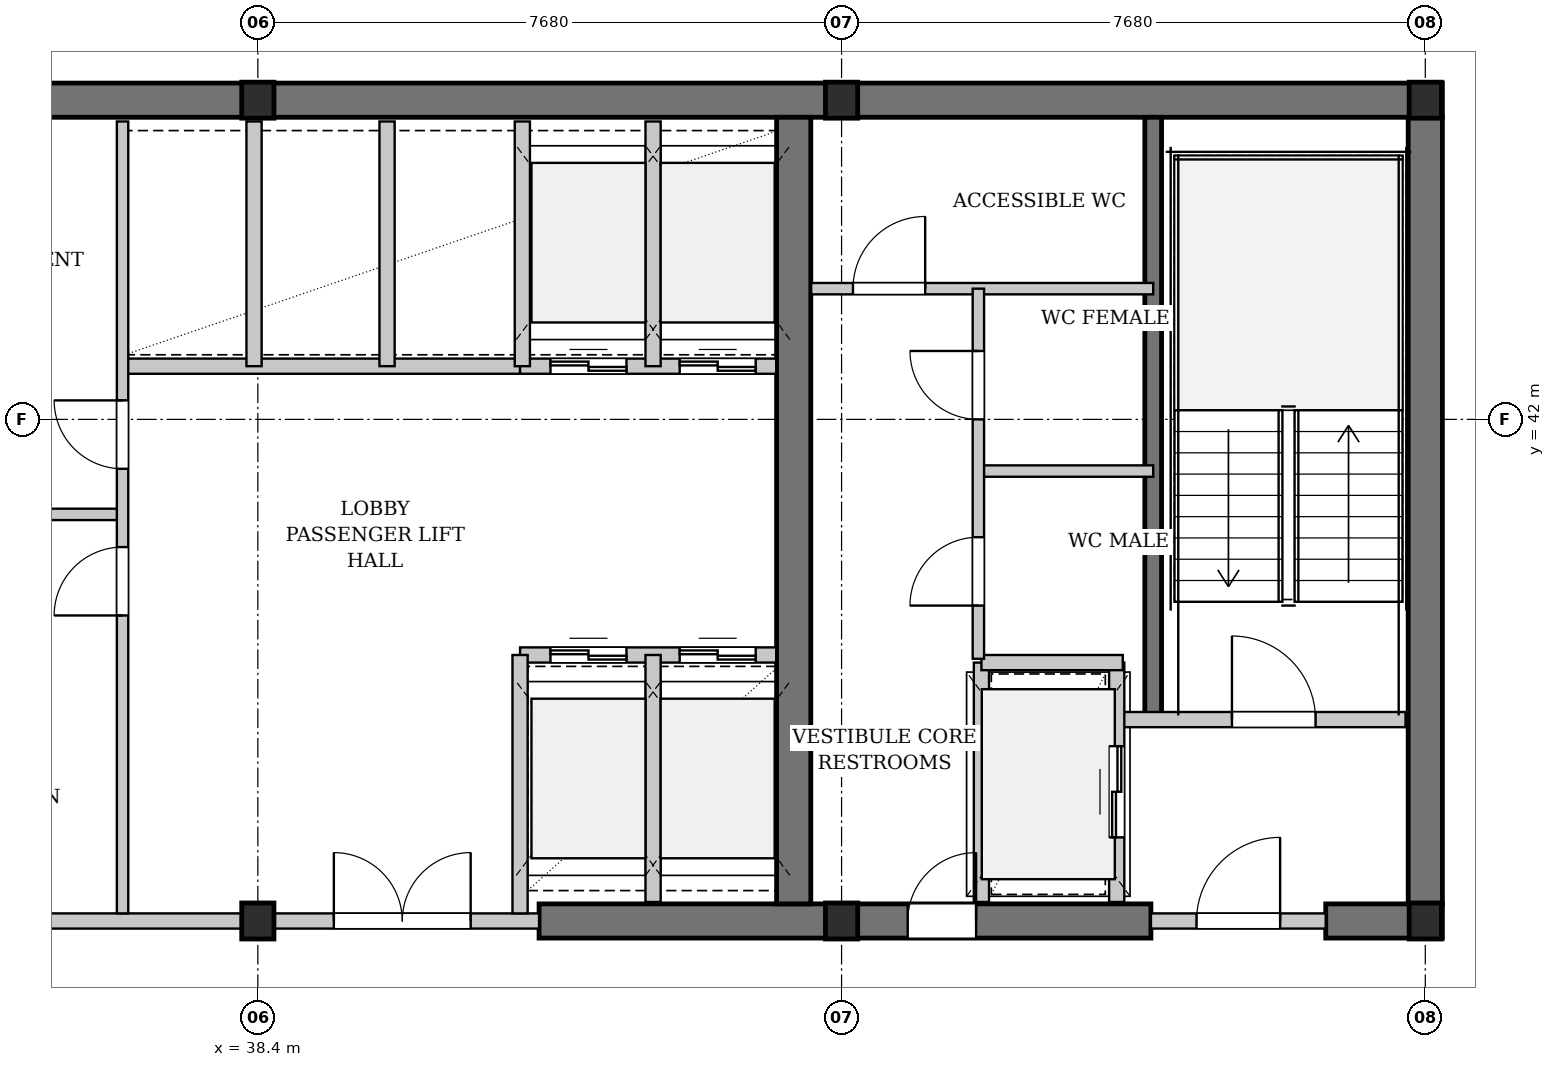
"""IFC4 building model, lengths in metres.
Left out: names, types, materials, properties, quantities, classifications, styles, units other than length and angle.
Written with IfcOpenShell. Run it as: python <this file> out.ifc"""

import sys

from ifc_helpers import new_model, si_unit, direction, frame, frame_2d, origin, origin_2d, place, context, subcontext, project, spatial, rectangle, i_section, extrude, element, fill, save


model = new_model("IFC4")
c1 = context("Model", 3, precision=1e-05, world=origin(), true_north=direction((0.0, 1.0)))
c2 = subcontext(c1, "Body", "Model", "MODEL_VIEW")
j1 = project(units=[si_unit("LENGTHUNIT", "METRE"), si_unit("PLANEANGLEUNIT", "RADIAN")], contexts=[c1])
p1 = place(None, origin())
s1 = spatial("IfcSite", under=j1, at=p1, CompositionType="ELEMENT")
p2 = place(p1, origin())
s2 = spatial("IfcBuilding", under=s1, at=p2, CompositionType="ELEMENT")
p3 = place(p2, frame((0.0, 0.0, 106.7)))
s3 = spatial("IfcBuildingStorey", under=s2, at=p3, CompositionType="ELEMENT", Elevation=106.7)
p4 = place(p3, frame((22.815, 46.2, 0.0), z_axis=(0.0, 0.0, 1.0), x_axis=(1.0, 0.0, 0.0)))
e1 = element("IfcWall", 1, at=p4, inside=s3, PredefinedType="SHEAR", context=c2, shape_type="SweptSolid", body=[
    extrude(rectangle(XDim=31.17, YDim=0.45, at=frame_2d((15.585, 0.0))), origin(), (0.0, 0.0, 1.0), 3.18),
])
p5 = place(p3, frame((42.1, 35.4, 0.0), z_axis=(0.0, 0.0, 1.0), x_axis=(1.0, 0.0, 0.0)))
e2 = element("IfcWall", 2, at=p5, inside=s3, PredefinedType="SHEAR", context=c2, shape_type="SweptSolid", body=[
    extrude(rectangle(XDim=8.05, YDim=0.45, at=frame_2d((4.025, 0.0))), origin(), (0.0, 0.0, 1.0), 3.18),
])
p6 = place(p5, frame((4.85, 0.0, 0.0)))
e3 = element("IfcOpeningElement", 3, at=p6, cuts=e2, PredefinedType="OPENING", context=c2, shape_type="SweptSolid", body=[
    extrude(rectangle(XDim=0.9, YDim=2.15, at=frame_2d((0.45, 1.075))), frame((0.0, 0.235, 0.0), z_axis=(0.0, -1.0, 0.0), x_axis=(1.0, 0.0, 0.0)), (0.0, 0.0, 1.0), 0.47),
])
p7 = place(p3, frame((52.45, 35.4, 0.0), z_axis=(0.0, 0.0, 1.0), x_axis=(1.0, 0.0, 0.0)))
e4 = element("IfcWall", 4, at=p7, inside=s3, PredefinedType="SHEAR", context=c2, shape_type="SweptSolid", body=[
    extrude(rectangle(XDim=1.535, YDim=0.45, at=frame_2d((0.768, 0.0))), origin(), (0.0, 0.0, 1.0), 3.18),
])
for number, where, z_axis, x_axis in (
    (5, (45.45, 35.625, 0.0), (0.0, 0.0, 1.0), (0.0, 1.0, 0.0)),
    (6, (53.76, 35.625, 0.0), (0.0, 0.0, 1.0), (0.0, 1.0, 0.0)),
):
    element("IfcWall", number, at=place(p3, frame(where, z_axis=z_axis, x_axis=x_axis)), inside=s3, PredefinedType="SHEAR", context=c2, shape_type="SweptSolid", body=[
        extrude(rectangle(XDim=10.35, YDim=0.45, at=frame_2d((5.175, 0.0))), origin(), (0.0, 0.0, 1.0), 3.18),
    ])
p8 = place(p3, frame((50.18, 38.05, 0.0), z_axis=(0.0, 0.0, 1.0), x_axis=(0.0, 1.0, 0.0)))
e7 = element("IfcWall", 7, at=p8, inside=s3, PredefinedType="SHEAR", context=c2, shape_type="SweptSolid", body=[
    extrude(rectangle(XDim=7.925, YDim=0.22, at=frame_2d((3.962, 0.0))), origin(), (0.0, 0.0, 1.0), 3.18),
])
for number, where, z_axis, x_axis in (
    (8, (38.4, 35.4, 0.0), (0.0, 0.0, 1.0), (1.0, 0.0, 0.0)),
    (9, (38.4, 46.2, 0.0), (0.0, 0.0, 1.0), (1.0, 0.0, 0.0)),
    (10, (46.08, 35.4, 0.0), (0.0, 0.0, 1.0), (1.0, 0.0, 0.0)),
    (11, (46.08, 46.2, 0.0), (0.0, 0.0, 1.0), (1.0, 0.0, 0.0)),
    (12, (53.76, 35.4, 0.0), (0.0, 0.0, 1.0), (1.0, 0.0, 0.0)),
    (13, (53.76, 46.2, 0.0), (0.0, 0.0, 1.0), (1.0, 0.0, 0.0)),
):
    element("IfcColumn", number, at=place(p3, frame(where, z_axis=z_axis, x_axis=x_axis)), inside=s3, PredefinedType="COLUMN", context=c2, shape_type="SweptSolid", body=[
        extrude(i_section(OverallWidth=0.424, OverallDepth=0.474, WebThickness=0.047, FlangeThickness=0.077, FilletRadius=0.015, at=origin_2d()), origin(), (0.0, 0.0, 1.0), 3.4),
    ])
p9 = place(p3, frame((35.6, 35.4, 0.0), z_axis=(0.0, 0.0, 1.0), x_axis=(1.0, 0.0, 0.0)))
e14 = element("IfcWall", 14, at=p9, inside=s3, PredefinedType="PARTITIONING", context=c2, shape_type="SweptSolid", body=[
    extrude(rectangle(XDim=6.5, YDim=0.2, at=frame_2d((3.25, 0.0))), origin(), (0.0, 0.0, 1.0), 2.525),
])
p10 = place(p9, frame((3.8, 0.0, 0.0)))
e15 = element("IfcOpeningElement", 15, at=p10, cuts=e14, PredefinedType="OPENING", context=c2, shape_type="SweptSolid", body=[
    extrude(rectangle(XDim=1.8, YDim=2.3, at=frame_2d((0.9, 1.15))), frame((0.0, 0.11, 0.0), z_axis=(0.0, -1.0, 0.0), x_axis=(1.0, 0.0, 0.0)), (0.0, 0.0, 1.0), 0.22),
])
p11 = place(p3, frame((36.6, 42.7, 0.0), z_axis=(0.0, 0.0, 1.0), x_axis=(1.0, 0.0, 0.0)))
e16 = element("IfcWall", 16, at=p11, inside=s3, PredefinedType="PARTITIONING", context=c2, shape_type="SweptSolid", body=[
    extrude(rectangle(XDim=5.25, YDim=0.2, at=frame_2d((2.625, 0.0))), origin(), (0.0, 0.0, 1.0), 3.18),
])
p12 = place(p3, frame((38.35, 42.7, 0.0), z_axis=(0.0, 0.0, 1.0), x_axis=(0.0, 1.0, 0.0)))
e17 = element("IfcWall", 17, at=p12, inside=s3, PredefinedType="PARTITIONING", context=c2, shape_type="SweptSolid", body=[
    extrude(rectangle(XDim=3.22, YDim=0.2, at=frame_2d((1.61, 0.0))), origin(), (0.0, 0.0, 1.0), 2.525),
])
p13 = place(p3, frame((40.1, 42.7, 0.0), z_axis=(0.0, 0.0, 1.0), x_axis=(0.0, 1.0, 0.0)))
e18 = element("IfcWall", 18, at=p13, inside=s3, PredefinedType="PARTITIONING", context=c2, shape_type="SweptSolid", body=[
    extrude(rectangle(XDim=3.22, YDim=0.2, at=frame_2d((1.61, 0.0))), origin(), (0.0, 0.0, 1.0), 3.18),
])
p14 = place(p3, frame((33.05, 40.75, 0.0), z_axis=(0.0, 0.0, 1.0), x_axis=(1.0, 0.0, 0.0)))
e19 = element("IfcWall", 19, at=p14, inside=s3, PredefinedType="PARTITIONING", context=c2, shape_type="SweptSolid", body=[
    extrude(rectangle(XDim=3.57, YDim=0.15, at=frame_2d((1.785, 0.0))), origin(), (0.0, 0.0, 1.0), 3.18),
])
p15 = place(p3, frame((36.62, 35.5, 0.0), z_axis=(0.0, 0.0, 1.0), x_axis=(0.0, 1.0, 0.0)))
e20 = element("IfcWall", 20, at=p15, inside=s3, PredefinedType="PARTITIONING", context=c2, shape_type="SweptSolid", body=[
    extrude(rectangle(XDim=10.42, YDim=0.15, at=frame_2d((5.21, 0.0))), origin(), (0.0, 0.0, 1.0), 3.18),
])
p16 = place(p15, frame((3.92, 0.0, 0.0)))
e21 = element("IfcOpeningElement", 21, at=p16, cuts=e20, PredefinedType="OPENING", context=c2, shape_type="SweptSolid", body=[
    extrude(rectangle(XDim=0.9, YDim=2.15, at=frame_2d((0.45, 1.075))), frame((0.0, 0.085, 0.0), z_axis=(0.0, -1.0, 0.0), x_axis=(1.0, 0.0, 0.0)), (0.0, 0.0, 1.0), 0.17),
])
p17 = place(p15, frame((5.85, 0.0, 0.0)))
e22 = element("IfcOpeningElement", 22, at=p17, cuts=e20, PredefinedType="OPENING", context=c2, shape_type="SweptSolid", body=[
    extrude(rectangle(XDim=0.9, YDim=2.15, at=frame_2d((0.45, 1.075))), frame((0.0, 0.085, 0.0), z_axis=(0.0, -1.0, 0.0), x_axis=(1.0, 0.0, 0.0)), (0.0, 0.0, 1.0), 0.17),
])
p18 = place(p3, frame((41.85, 38.9, 0.0), z_axis=(0.0, 0.0, 1.0), x_axis=(1.0, 0.0, 0.0)))
e23 = element("IfcWall", 23, at=p18, inside=s3, PredefinedType="PARTITIONING", context=c2, shape_type="SweptSolid", body=[
    extrude(rectangle(XDim=3.37, YDim=0.2, at=frame_2d((1.685, 0.0))), origin(), (0.0, 0.0, 1.0), 3.18),
])
p19 = place(p18, frame((0.4, 0.0, 0.0)))
e24 = element("IfcOpeningElement", 24, at=p19, cuts=e23, PredefinedType="OPENING", context=c2, shape_type="SweptSolid", body=[
    extrude(rectangle(XDim=1.0, YDim=2.2, at=frame_2d((0.5, 1.1))), frame((0.0, 0.11, 0.0), z_axis=(0.0, -1.0, 0.0), x_axis=(1.0, 0.0, 0.0)), (0.0, 0.0, 1.0), 0.22),
])
p20 = place(p18, frame((2.1, 0.0, 0.0)))
e25 = element("IfcOpeningElement", 25, at=p20, cuts=e23, PredefinedType="OPENING", context=c2, shape_type="SweptSolid", body=[
    extrude(rectangle(XDim=1.0, YDim=2.2, at=frame_2d((0.5, 1.1))), frame((0.0, 0.11, 0.0), z_axis=(0.0, -1.0, 0.0), x_axis=(1.0, 0.0, 0.0)), (0.0, 0.0, 1.0), 0.22),
])
p21 = place(p3, frame((41.85, 42.7, 0.0), z_axis=(0.0, 0.0, 1.0), x_axis=(1.0, 0.0, 0.0)))
e26 = element("IfcWall", 26, at=p21, inside=s3, PredefinedType="PARTITIONING", context=c2, shape_type="SweptSolid", body=[
    extrude(rectangle(XDim=3.37, YDim=0.2, at=frame_2d((1.685, 0.0))), origin(), (0.0, 0.0, 1.0), 3.18),
])
p22 = place(p21, frame((0.4, 0.0, 0.0)))
e27 = element("IfcOpeningElement", 27, at=p22, cuts=e26, PredefinedType="OPENING", context=c2, shape_type="SweptSolid", body=[
    extrude(rectangle(XDim=1.0, YDim=2.2, at=frame_2d((0.5, 1.1))), frame((0.0, 0.11, 0.0), z_axis=(0.0, -1.0, 0.0), x_axis=(1.0, 0.0, 0.0)), (0.0, 0.0, 1.0), 0.22),
])
p23 = place(p21, frame((2.1, 0.0, 0.0)))
e28 = element("IfcOpeningElement", 28, at=p23, cuts=e26, PredefinedType="OPENING", context=c2, shape_type="SweptSolid", body=[
    extrude(rectangle(XDim=1.0, YDim=2.2, at=frame_2d((0.5, 1.1))), frame((0.0, 0.11, 0.0), z_axis=(0.0, -1.0, 0.0), x_axis=(1.0, 0.0, 0.0)), (0.0, 0.0, 1.0), 0.22),
])
p24 = place(p3, frame((43.6, 35.65, 0.0), z_axis=(0.0, 0.0, 1.0), x_axis=(0.0, 1.0, 0.0)))
e29 = element("IfcWall", 29, at=p24, inside=s3, PredefinedType="PARTITIONING", context=c2, shape_type="SweptSolid", body=[
    extrude(rectangle(XDim=3.25, YDim=0.2, at=frame_2d((1.625, 0.0))), origin(), (0.0, 0.0, 1.0), 3.18),
])
p25 = place(p3, frame((43.6, 42.7, 0.0), z_axis=(0.0, 0.0, 1.0), x_axis=(0.0, 1.0, 0.0)))
e30 = element("IfcWall", 30, at=p25, inside=s3, PredefinedType="PARTITIONING", context=c2, shape_type="SweptSolid", body=[
    extrude(rectangle(XDim=3.22, YDim=0.2, at=frame_2d((1.61, 0.0))), origin(), (0.0, 0.0, 1.0), 3.18),
])
p26 = place(p3, frame((41.85, 35.5, 0.0), z_axis=(0.0, 0.0, 1.0), x_axis=(0.0, 1.0, 0.0)))
e31 = element("IfcWall", 31, at=p26, inside=s3, PredefinedType="PARTITIONING", context=c2, shape_type="SweptSolid", body=[
    extrude(rectangle(XDim=3.4, YDim=0.2, at=frame_2d((1.7, 0.0))), origin(), (0.0, 0.0, 1.0), 3.18),
])
p27 = place(p3, frame((41.88, 42.7, 0.0), z_axis=(0.0, 0.0, 1.0), x_axis=(0.0, 1.0, 0.0)))
e32 = element("IfcWall", 32, at=p27, inside=s3, PredefinedType="PARTITIONING", context=c2, shape_type="SweptSolid", body=[
    extrude(rectangle(XDim=3.22, YDim=0.2, at=frame_2d((1.61, 0.0))), origin(), (0.0, 0.0, 1.0), 3.18),
])
p28 = place(p3, frame((49.78, 38.05, 0.0), z_axis=(0.0, 0.0, 1.0), x_axis=(1.0, 0.0, 0.0)))
e33 = element("IfcWall", 33, at=p28, inside=s3, PredefinedType="PARTITIONING", context=c2, shape_type="SweptSolid", body=[
    extrude(rectangle(XDim=3.72, YDim=0.2, at=frame_2d((1.86, 0.0))), origin(), (0.0, 0.0, 1.0), 3.18),
])
p29 = place(p28, frame((1.436, 0.0, 0.0)))
e34 = element("IfcOpeningElement", 34, at=p29, cuts=e33, PredefinedType="OPENING", context=c2, shape_type="SweptSolid", body=[
    extrude(rectangle(XDim=1.1, YDim=2.15, at=frame_2d((0.55, 1.075))), frame((0.0, 0.11, 0.0), z_axis=(0.0, -1.0, 0.0), x_axis=(1.0, 0.0, 0.0)), (0.0, 0.0, 1.0), 0.22),
])
p30 = place(p3, frame((50.15, 35.4, 0.0), z_axis=(0.0, 0.0, 1.0), x_axis=(1.0, 0.0, 0.0)))
e35 = element("IfcWall", 35, at=p30, inside=s3, PredefinedType="PARTITIONING", context=c2, shape_type="SweptSolid", body=[
    extrude(rectangle(XDim=2.3, YDim=0.2, at=frame_2d((1.15, 0.0))), origin(), (0.0, 0.0, 1.0), 2.525),
])
p31 = place(p30, frame((0.6, 0.0, 0.0)))
e36 = element("IfcOpeningElement", 36, at=p31, cuts=e35, PredefinedType="OPENING", context=c2, shape_type="SweptSolid", body=[
    extrude(rectangle(XDim=1.1, YDim=2.15, at=frame_2d((0.55, 1.075))), frame((0.0, 0.11, 0.0), z_axis=(0.0, -1.0, 0.0), x_axis=(1.0, 0.0, 0.0)), (0.0, 0.0, 1.0), 0.22),
])
p32 = place(p3, frame((49.7, 35.65, 0.0), z_axis=(0.0, 0.0, 1.0), x_axis=(0.0, 1.0, 0.0)))
e37 = element("IfcWall", 37, at=p32, inside=s3, PredefinedType="PARTITIONING", context=c2, shape_type="SweptSolid", body=[
    extrude(rectangle(XDim=3.15, YDim=0.2, at=frame_2d((1.575, 0.0))), origin(), (0.0, 0.0, 1.0), 3.18),
])
p33 = place(p32, frame((0.85, 0.0, 0.0)))
e38 = element("IfcOpeningElement", 38, at=p33, cuts=e37, PredefinedType="OPENING", context=c2, shape_type="SweptSolid", body=[
    extrude(rectangle(XDim=1.2, YDim=2.2, at=frame_2d((0.6, 1.1))), frame((0.0, 0.11, 0.0), z_axis=(0.0, -1.0, 0.0), x_axis=(1.0, 0.0, 0.0)), (0.0, 0.0, 1.0), 0.22),
])
p34 = place(p3, frame((47.92, 35.65, 0.0), z_axis=(0.0, 0.0, 1.0), x_axis=(0.0, 1.0, 0.0)))
e39 = element("IfcWall", 39, at=p34, inside=s3, PredefinedType="PARTITIONING", context=c2, shape_type="SweptSolid", body=[
    extrude(rectangle(XDim=3.15, YDim=0.2, at=frame_2d((1.575, 0.0))), origin(), (0.0, 0.0, 1.0), 3.18),
])
p35 = place(p3, frame((47.92, 38.8, 0.0), z_axis=(0.0, 0.0, 1.0), x_axis=(1.0, 0.0, 0.0)))
e40 = element("IfcWall", 40, at=p35, inside=s3, PredefinedType="PARTITIONING", context=c2, shape_type="SweptSolid", body=[
    extrude(rectangle(XDim=1.86, YDim=0.2, at=frame_2d((0.93, 0.0))), origin(), (0.0, 0.0, 1.0), 3.18),
])
p36 = place(p3, frame((45.68, 43.72, 0.0), z_axis=(0.0, 0.0, 1.0), x_axis=(1.0, 0.0, 0.0)))
e41 = element("IfcWall", 41, at=p36, inside=s3, PredefinedType="PARTITIONING", context=c2, shape_type="SweptSolid", body=[
    extrude(rectangle(XDim=4.5, YDim=0.15, at=frame_2d((2.25, 0.0))), origin(), (0.0, 0.0, 1.0), 3.18),
])
p37 = place(p36, frame((0.55, 0.0, 0.0)))
e42 = element("IfcOpeningElement", 42, at=p37, cuts=e41, PredefinedType="OPENING", context=c2, shape_type="SweptSolid", body=[
    extrude(rectangle(XDim=0.95, YDim=2.15, at=frame_2d((0.475, 1.075))), frame((0.0, 0.085, 0.0), z_axis=(0.0, -1.0, 0.0), x_axis=(1.0, 0.0, 0.0)), (0.0, 0.0, 1.0), 0.17),
])
p38 = place(p3, frame((47.88, 41.32, 0.0), z_axis=(0.0, 0.0, 1.0), x_axis=(1.0, 0.0, 0.0)))
e43 = element("IfcWall", 43, at=p38, inside=s3, PredefinedType="PARTITIONING", context=c2, shape_type="SweptSolid", body=[
    extrude(rectangle(XDim=2.3, YDim=0.15, at=frame_2d((1.15, 0.0))), origin(), (0.0, 0.0, 1.0), 3.18),
])
p39 = place(p3, frame((47.88, 38.85, 0.0), z_axis=(0.0, 0.0, 1.0), x_axis=(0.0, 1.0, 0.0)))
e44 = element("IfcWall", 44, at=p39, inside=s3, PredefinedType="PARTITIONING", context=c2, shape_type="SweptSolid", body=[
    extrude(rectangle(XDim=4.87, YDim=0.15, at=frame_2d((2.435, 0.0))), origin(), (0.0, 0.0, 1.0), 3.18),
])
p40 = place(p39, frame((0.7, 0.0, 0.0)))
e45 = element("IfcOpeningElement", 45, at=p40, cuts=e44, PredefinedType="OPENING", context=c2, shape_type="SweptSolid", body=[
    extrude(rectangle(XDim=0.9, YDim=2.15, at=frame_2d((0.45, 1.075))), frame((0.0, 0.085, 0.0), z_axis=(0.0, -1.0, 0.0), x_axis=(1.0, 0.0, 0.0)), (0.0, 0.0, 1.0), 0.17),
])
p41 = place(p39, frame((3.15, 0.0, 0.0)))
e46 = element("IfcOpeningElement", 46, at=p41, cuts=e44, PredefinedType="OPENING", context=c2, shape_type="SweptSolid", body=[
    extrude(rectangle(XDim=0.9, YDim=2.15, at=frame_2d((0.45, 1.075))), frame((0.0, 0.085, 0.0), z_axis=(0.0, -1.0, 0.0), x_axis=(1.0, 0.0, 0.0)), (0.0, 0.0, 1.0), 0.17),
])
p42 = place(p10, origin())
e47 = element("IfcDoor", 47, at=p42, inside=s3, OperationType="DOUBLE_DOOR_SINGLE_SWING", PredefinedType="DOOR", context=c2, shape_type="SweptSolid", body=[
    extrude(rectangle(XDim=1.8, YDim=2.3, at=frame_2d((0.9, 1.15))), frame((0.0, 0.025, 0.0), z_axis=(0.0, -1.0, 0.0), x_axis=(1.0, 0.0, 0.0)), (0.0, 0.0, 1.0), 0.05),
])
fill(e15, e47)
p43 = place(p16, origin())
e48 = element("IfcDoor", 48, at=p43, inside=s3, OperationType="SINGLE_SWING_LEFT", PredefinedType="DOOR", context=c2, shape_type="SweptSolid", body=[
    extrude(rectangle(XDim=0.9, YDim=2.15, at=frame_2d((0.45, 1.075))), frame((0.0, 0.025, 0.0), z_axis=(0.0, -1.0, 0.0), x_axis=(1.0, 0.0, 0.0)), (0.0, 0.0, 1.0), 0.05),
])
fill(e21, e48)
p44 = place(p17, origin())
e49 = element("IfcDoor", 49, at=p44, inside=s3, OperationType="SINGLE_SWING_RIGHT", PredefinedType="DOOR", context=c2, shape_type="SweptSolid", body=[
    extrude(rectangle(XDim=0.9, YDim=2.15, at=frame_2d((0.45, 1.075))), frame((0.0, 0.025, 0.0), z_axis=(0.0, -1.0, 0.0), x_axis=(1.0, 0.0, 0.0)), (0.0, 0.0, 1.0), 0.05),
])
fill(e22, e49)
p45 = place(p19, origin())
e50 = element("IfcDoor", 50, at=p45, inside=s3, OperationType="DOUBLE_DOOR_SLIDING", PredefinedType="DOOR", context=c2, shape_type="SweptSolid", body=[
    extrude(rectangle(XDim=1.0, YDim=2.2, at=frame_2d((0.5, 1.1))), frame((0.0, 0.025, 0.0), z_axis=(0.0, -1.0, 0.0), x_axis=(1.0, 0.0, 0.0)), (0.0, 0.0, 1.0), 0.05),
])
fill(e24, e50)
p46 = place(p20, origin())
e51 = element("IfcDoor", 51, at=p46, inside=s3, OperationType="DOUBLE_DOOR_SLIDING", PredefinedType="DOOR", context=c2, shape_type="SweptSolid", body=[
    extrude(rectangle(XDim=1.0, YDim=2.2, at=frame_2d((0.5, 1.1))), frame((0.0, 0.025, 0.0), z_axis=(0.0, -1.0, 0.0), x_axis=(1.0, 0.0, 0.0)), (0.0, 0.0, 1.0), 0.05),
])
fill(e25, e51)
p47 = place(p22, origin())
e52 = element("IfcDoor", 52, at=p47, inside=s3, OperationType="DOUBLE_DOOR_SLIDING", PredefinedType="DOOR", context=c2, shape_type="SweptSolid", body=[
    extrude(rectangle(XDim=1.0, YDim=2.2, at=frame_2d((0.5, 1.1))), frame((0.0, 0.025, 0.0), z_axis=(0.0, -1.0, 0.0), x_axis=(1.0, 0.0, 0.0)), (0.0, 0.0, 1.0), 0.05),
])
fill(e27, e52)
p48 = place(p23, origin())
e53 = element("IfcDoor", 53, at=p48, inside=s3, OperationType="DOUBLE_DOOR_SLIDING", PredefinedType="DOOR", context=c2, shape_type="SweptSolid", body=[
    extrude(rectangle(XDim=1.0, YDim=2.2, at=frame_2d((0.5, 1.1))), frame((0.0, 0.025, 0.0), z_axis=(0.0, -1.0, 0.0), x_axis=(1.0, 0.0, 0.0)), (0.0, 0.0, 1.0), 0.05),
])
fill(e28, e53)
p49 = place(p29, origin())
e54 = element("IfcDoor", 54, at=p49, inside=s3, OperationType="SINGLE_SWING_LEFT", PredefinedType="DOOR", context=c2, shape_type="SweptSolid", body=[
    extrude(rectangle(XDim=1.1, YDim=2.15, at=frame_2d((0.55, 1.075))), frame((0.0, 0.025, 0.0), z_axis=(0.0, -1.0, 0.0), x_axis=(1.0, 0.0, 0.0)), (0.0, 0.0, 1.0), 0.05),
])
fill(e34, e54)
p50 = place(p31, origin())
e55 = element("IfcDoor", 55, at=p50, inside=s3, OperationType="SINGLE_SWING_RIGHT", PredefinedType="DOOR", context=c2, shape_type="SweptSolid", body=[
    extrude(rectangle(XDim=1.1, YDim=2.15, at=frame_2d((0.55, 1.075))), frame((0.0, 0.025, 0.0), z_axis=(0.0, -1.0, 0.0), x_axis=(1.0, 0.0, 0.0)), (0.0, 0.0, 1.0), 0.05),
])
fill(e36, e55)
p51 = place(p33, origin())
e56 = element("IfcDoor", 56, at=p51, inside=s3, OperationType="DOUBLE_DOOR_SLIDING", PredefinedType="DOOR", context=c2, shape_type="SweptSolid", body=[
    extrude(rectangle(XDim=1.2, YDim=2.2, at=frame_2d((0.6, 1.1))), frame((0.0, 0.025, 0.0), z_axis=(0.0, -1.0, 0.0), x_axis=(1.0, 0.0, 0.0)), (0.0, 0.0, 1.0), 0.05),
])
fill(e38, e56)
p52 = place(p37, origin())
e57 = element("IfcDoor", 57, at=p52, inside=s3, OperationType="SINGLE_SWING_RIGHT", PredefinedType="DOOR", context=c2, shape_type="SweptSolid", body=[
    extrude(rectangle(XDim=0.95, YDim=2.15, at=frame_2d((0.475, 1.075))), frame((0.0, 0.025, 0.0), z_axis=(0.0, -1.0, 0.0), x_axis=(1.0, 0.0, 0.0)), (0.0, 0.0, 1.0), 0.05),
])
fill(e42, e57)
p53 = place(p40, origin())
e58 = element("IfcDoor", 58, at=p53, inside=s3, OperationType="SINGLE_SWING_LEFT", PredefinedType="DOOR", context=c2, shape_type="SweptSolid", body=[
    extrude(rectangle(XDim=0.9, YDim=2.15, at=frame_2d((0.45, 1.075))), frame((0.0, 0.025, 0.0), z_axis=(0.0, -1.0, 0.0), x_axis=(1.0, 0.0, 0.0)), (0.0, 0.0, 1.0), 0.05),
])
fill(e45, e58)
p54 = place(p41, origin())
e59 = element("IfcDoor", 59, at=p54, inside=s3, OperationType="SINGLE_SWING_RIGHT", PredefinedType="DOOR", context=c2, shape_type="SweptSolid", body=[
    extrude(rectangle(XDim=0.9, YDim=2.15, at=frame_2d((0.45, 1.075))), frame((0.0, 0.025, 0.0), z_axis=(0.0, -1.0, 0.0), x_axis=(1.0, 0.0, 0.0)), (0.0, 0.0, 1.0), 0.05),
])
fill(e46, e59)
p55 = place(p6, origin())
e60 = element("IfcDoor", 60, at=p55, inside=s3, OperationType="SINGLE_SWING_RIGHT", PredefinedType="DOOR", context=c2, shape_type="SweptSolid", body=[
    extrude(rectangle(XDim=0.9, YDim=2.15, at=frame_2d((0.45, 1.075))), frame((0.0, 0.025, 0.0), z_axis=(0.0, -1.0, 0.0), x_axis=(1.0, 0.0, 0.0)), (0.0, 0.0, 1.0), 0.05),
])
fill(e3, e60)
save(model, sys.argv[1])
